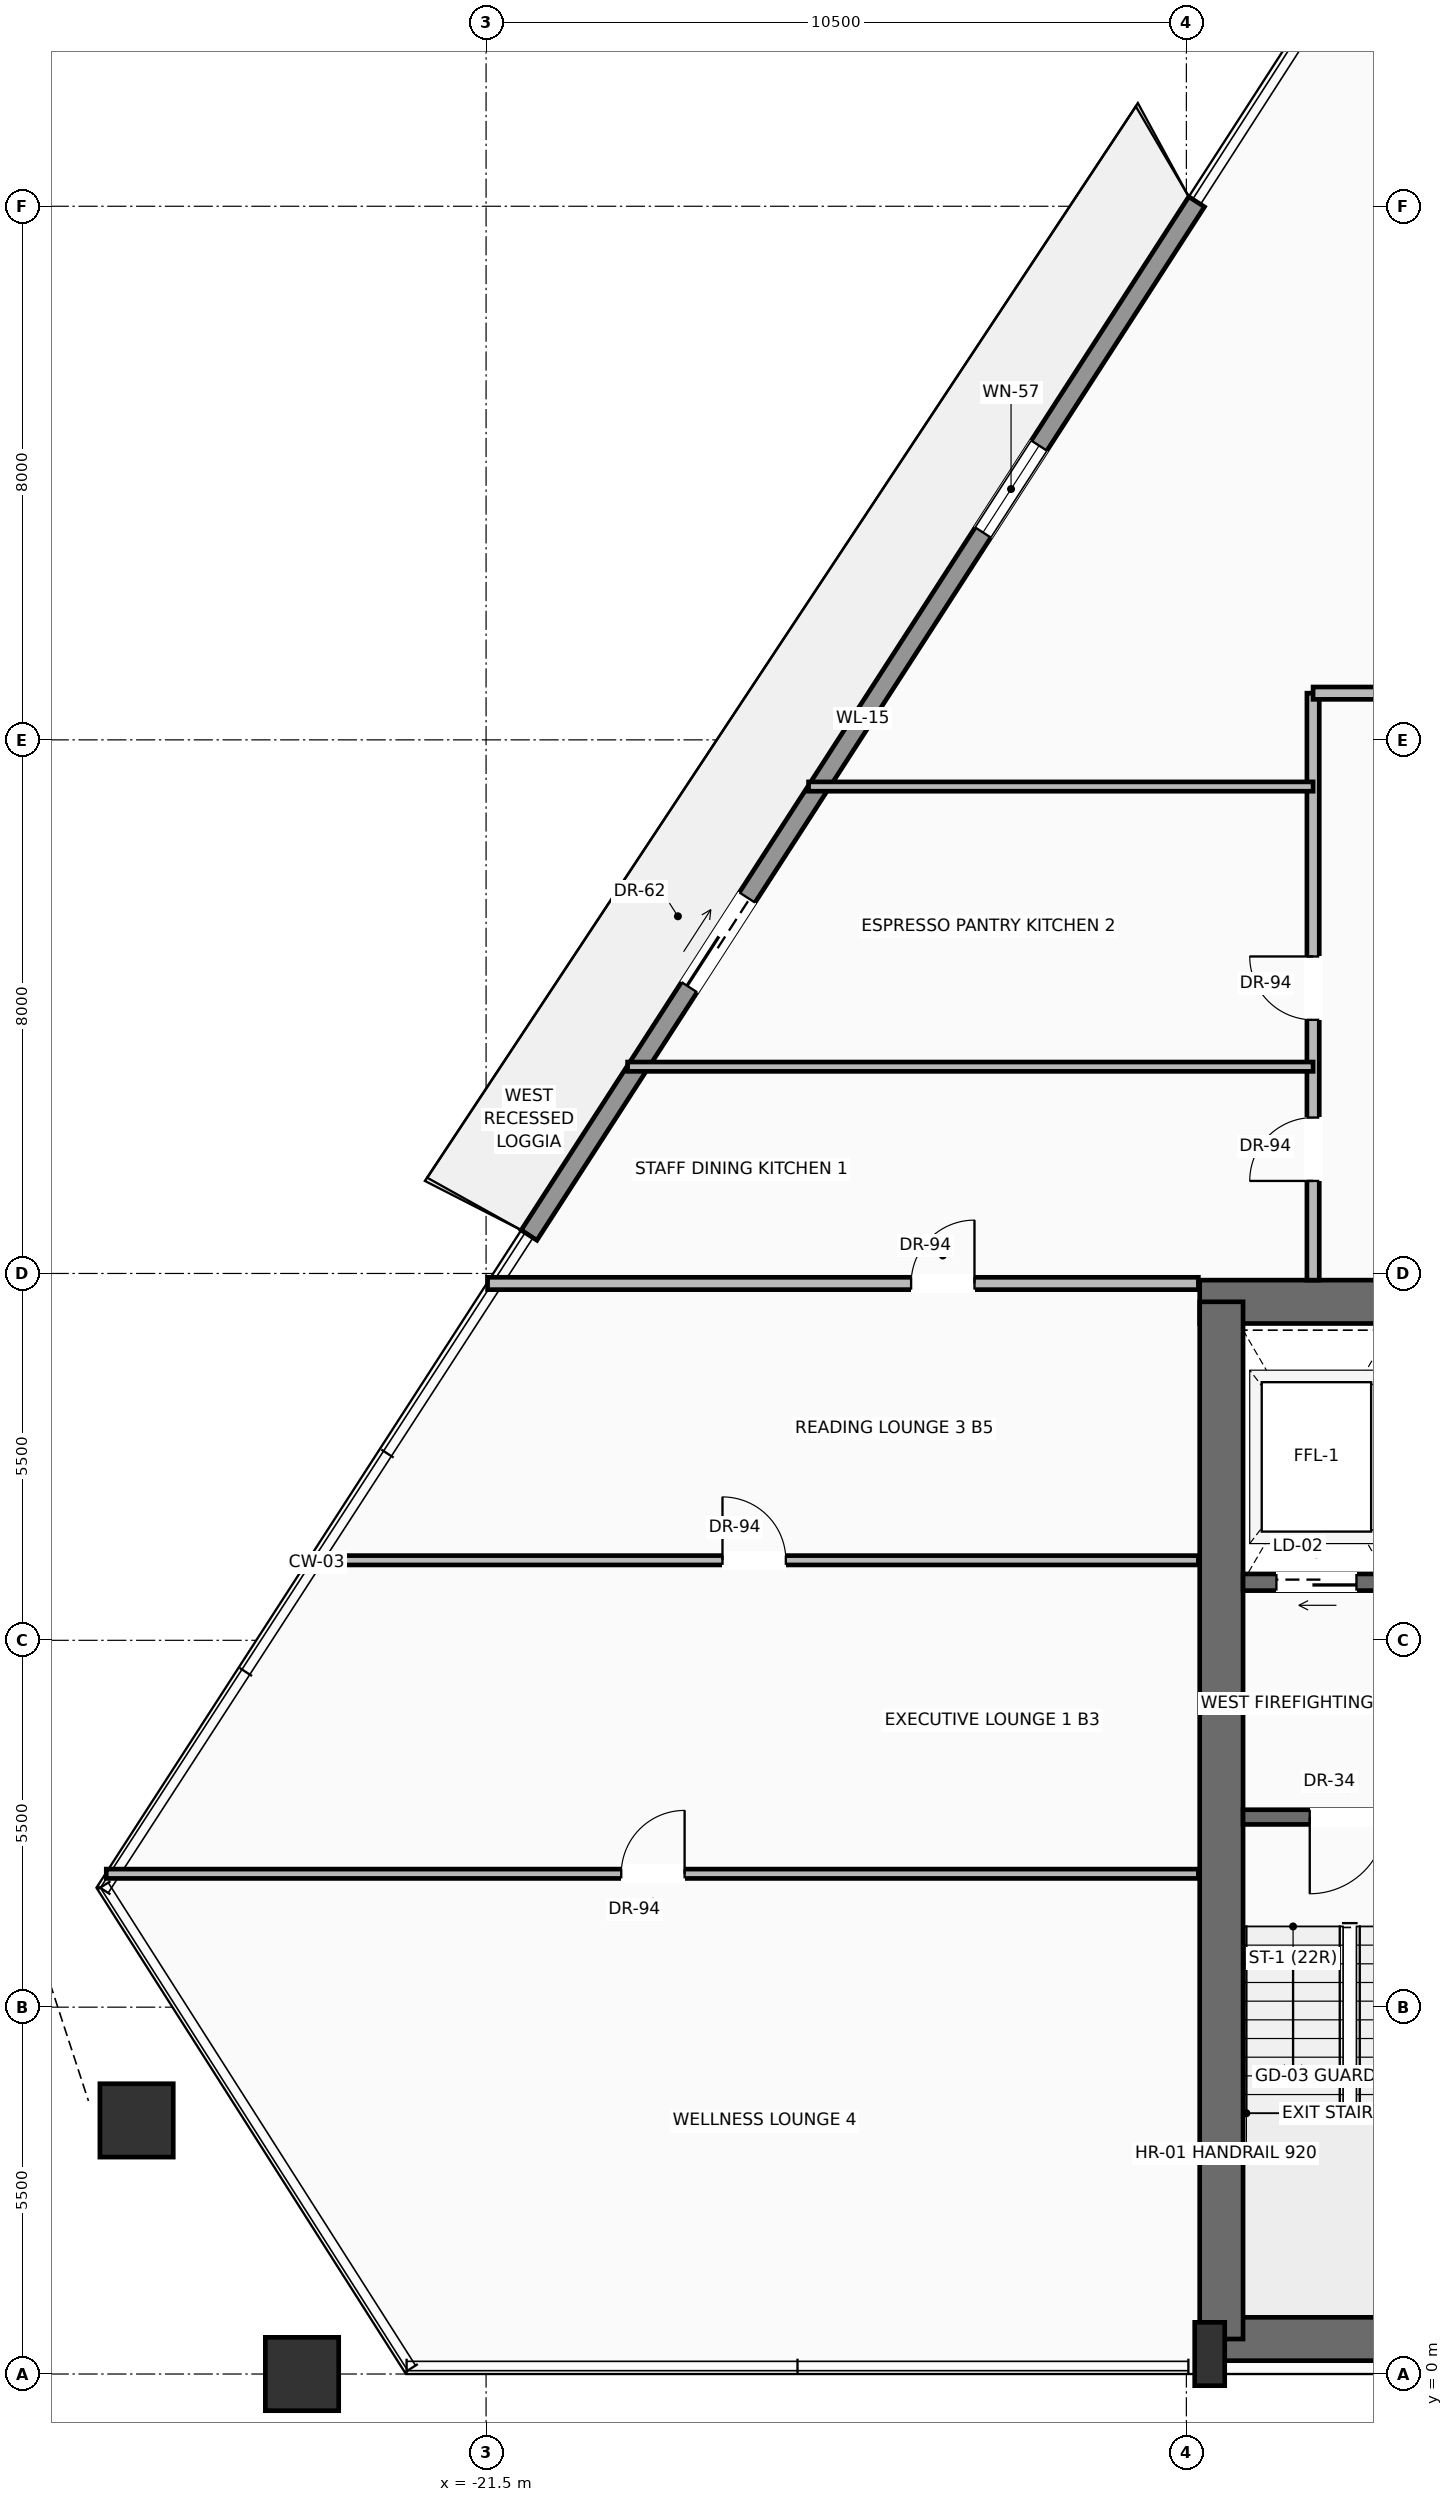
"""IFC4 building model, lengths in metres.
Left out: names, types, materials, properties, quantities, classifications, styles, units other than length and angle.
Written with IfcOpenShell. Run it as: python <this file> out.ifc"""

import sys

from ifc_helpers import new_model, si_unit, direction, frame, frame_2d, origin, origin_2d, place, context, subcontext, project, spatial, rectangle, hollow_rectangle, extrude, source, transform, mapped, element, fill, save


model = new_model("IFC4")
c1 = context("Model", 3, precision=1e-05, world=origin(), true_north=direction((0.0, 1.0)))
c2 = subcontext(c1, "Body", "Model", "MODEL_VIEW")
j1 = project(units=[si_unit("LENGTHUNIT", "METRE"), si_unit("PLANEANGLEUNIT", "RADIAN")], contexts=[c1])
p1 = place(None, origin())
s1 = spatial("IfcSite", under=j1, at=p1, CompositionType="ELEMENT")
p2 = place(p1, origin())
s2 = spatial("IfcBuilding", under=s1, at=p2, CompositionType="ELEMENT")
p3 = place(p2, frame((0.0, 0.0, 147.8)))
s3 = spatial("IfcBuildingStorey", under=s2, at=p3, CompositionType="ELEMENT", Elevation=147.8)
p4 = place(p3, frame((-10.65, 0.525, 0.0), z_axis=(0.0, 0.0, 1.0), x_axis=(1.0, 0.0, 0.0)))
e1 = element("IfcWall", 1, at=p4, inside=s3, PredefinedType="SHEAR", context=c2, shape_type="SweptSolid", body=[
    extrude(rectangle(XDim=21.3, YDim=0.65, at=frame_2d((10.65, 0.0))), origin(), (0.0, 0.0, 1.0), 3.47),
])
p5 = place(p3, frame((-10.8, 16.075, 0.0), z_axis=(0.0, 0.0, 1.0), x_axis=(1.0, 0.0, 0.0)))
e2 = element("IfcWall", 2, at=p5, inside=s3, PredefinedType="SHEAR", context=c2, shape_type="SweptSolid", body=[
    extrude(rectangle(XDim=21.6, YDim=0.65, at=frame_2d((10.8, 0.0))), origin(), (0.0, 0.0, 1.0), 3.47),
])
p6 = place(p5, frame((3.37, 0.0, 0.0)))
e3 = element("IfcOpeningElement", 3, at=p6, cuts=e2, PredefinedType="OPENING", context=c2, shape_type="SweptSolid", body=[
    extrude(rectangle(XDim=1.3, YDim=2.3, at=frame_2d((0.65, 1.15))), frame((0.0, 0.335, 0.0), z_axis=(0.0, -1.0, 0.0), x_axis=(1.0, 0.0, 0.0)), (0.0, 0.0, 1.0), 0.67),
])
p7 = place(p5, frame((9.8, 0.0, 0.0)))
e4 = element("IfcOpeningElement", 4, at=p7, cuts=e2, PredefinedType="OPENING", context=c2, shape_type="SweptSolid", body=[
    extrude(rectangle(XDim=2.0, YDim=2.4, at=frame_2d((1.0, 1.2))), frame((0.0, 0.335, 0.0), z_axis=(0.0, -1.0, 0.0), x_axis=(1.0, 0.0, 0.0)), (0.0, 0.0, 1.0), 0.67),
])
p8 = place(p3, frame((-10.475, 0.525, 0.0), z_axis=(0.0, 0.0, 1.0), x_axis=(0.0, 1.0, 0.0)))
e5 = element("IfcWall", 5, at=p8, inside=s3, PredefinedType="SHEAR", context=c2, shape_type="SweptSolid", body=[
    extrude(rectangle(XDim=15.55, YDim=0.65, at=frame_2d((7.775, 0.0))), origin(), (0.0, 0.0, 1.0), 3.47),
])
m1 = source(origin(), c2, "Body", "SweptSolid", [
    extrude(rectangle(XDim=0.45, YDim=0.95, at=origin_2d()), origin(), (0.0, 0.0, 1.0), 3.7),
])
p9 = place(p3, frame((-10.65, 0.3, 0.0), z_axis=(0.0, 0.0, 1.0), x_axis=(1.0, 0.0, 0.0)))
e6 = element("IfcColumn", 6, at=p9, inside=s3, PredefinedType="PILASTER", context=c2, shape_type="MappedRepresentation", body=[
    mapped(m1, transform((0.0, 0.0, 0.0), scale=1.0)),
])
m2 = source(origin(), c2, "Body", "SweptSolid", [
    extrude(hollow_rectangle(XDim=1.1, YDim=1.1, WallThickness=0.055, at=origin_2d()), origin(), (0.0, 0.0, 1.0), 3.691),
])
p10 = place(p3, frame((-24.26, 0.0, 0.004), z_axis=(-0.010185330494, 0.0, 0.999948128176), x_axis=(0.0, -1.0, 0.0)))
e7 = element("IfcColumn", 7, at=p10, inside=s3, PredefinedType="COLUMN", context=c2, shape_type="MappedRepresentation", body=[
    mapped(m2, transform((0.0, 0.0, 0.0), scale=1.0)),
])
m3 = source(origin(), c2, "Body", "SweptSolid", [
    extrude(hollow_rectangle(XDim=1.1, YDim=1.1, WallThickness=0.055, at=origin_2d()), origin(), (0.0, 0.0, 1.0), 3.692),
])
p11 = place(p3, frame((-26.74, 3.802, 0.004), z_axis=(0.000462934236, -0.016004297866, 0.999871815855), x_axis=(0.999581916595, 0.028913526513, 0.0)))
e8 = element("IfcColumn", 8, at=p11, inside=s3, PredefinedType="COLUMN", context=c2, shape_type="MappedRepresentation", body=[
    mapped(m3, transform((0.0, 0.0, 0.0), scale=1.0)),
])
p12 = place(p3, frame((-20.855, 17.074, 0.0), z_axis=(0.0, 0.0, 1.0), x_axis=(0.542622723872, 0.839976535112, 0.0)))
e9 = element("IfcWall", 9, at=p12, inside=s3, PredefinedType="SOLIDWALL", context=c2, shape_type="SweptSolid", body=[
    extrude(rectangle(XDim=18.445, YDim=0.28, at=frame_2d((9.222, 0.0))), origin(), (0.0, 0.0, 1.0), 3.05),
])
p13 = place(p12, frame((4.427, 0.0, 0.0)))
e10 = element("IfcOpeningElement", 10, at=p13, cuts=e9, PredefinedType="OPENING", context=c2, shape_type="SweptSolid", body=[
    extrude(rectangle(XDim=1.6, YDim=2.35, at=frame_2d((0.8, 1.175))), frame((0.0, 0.15, 0.0), z_axis=(0.0, -1.0, 0.0), x_axis=(1.0, 0.0, 0.0)), (0.0, 0.0, 1.0), 0.3),
])
p14 = place(p12, frame((12.542, 0.0, 0.9)))
e11 = element("IfcOpeningElement", 11, at=p14, cuts=e9, PredefinedType="OPENING", context=c2, shape_type="SweptSolid", body=[
    extrude(rectangle(XDim=1.55, YDim=1.85, at=frame_2d((0.775, 0.925))), frame((0.0, 0.15, 0.0), z_axis=(0.0, -1.0, 0.0), x_axis=(1.0, 0.0, 0.0)), (0.0, 0.0, 1.0), 0.3),
])
p15 = place(p3, frame((-5.5, 8.35, 0.0), z_axis=(0.0, 0.0, 1.0), x_axis=(-1.0, 0.0, 0.0)))
e12 = element("IfcWall", 12, at=p15, inside=s3, PredefinedType="SOLIDWALL", context=c2, shape_type="SweptSolid", body=[
    extrude(rectangle(XDim=4.65, YDim=0.22, at=frame_2d((2.325, 0.0))), origin(), (0.0, 0.0, 1.0), 3.47),
])
p16 = place(p15, frame((2.5, 0.0, 0.0)))
e13 = element("IfcOpeningElement", 13, at=p16, cuts=e12, PredefinedType="OPENING", context=c2, shape_type="SweptSolid", body=[
    extrude(rectangle(XDim=1.15, YDim=2.2, at=frame_2d((0.575, 1.1))), frame((0.0, 0.12, 0.0), z_axis=(0.0, -1.0, 0.0), x_axis=(1.0, 0.0, 0.0)), (0.0, 0.0, 1.0), 0.24),
])
p17 = place(p3, frame((-5.5, 11.87, 0.0), z_axis=(0.0, 0.0, 1.0), x_axis=(-1.0, 0.0, 0.0)))
e14 = element("IfcWall", 14, at=p17, inside=s3, PredefinedType="SOLIDWALL", context=c2, shape_type="SweptSolid", body=[
    extrude(rectangle(XDim=4.65, YDim=0.25, at=frame_2d((2.325, 0.0))), origin(), (0.0, 0.0, 1.0), 3.47),
])
p18 = place(p17, frame((2.95, 0.0, 0.0)))
e15 = element("IfcOpeningElement", 15, at=p18, cuts=e14, PredefinedType="OPENING", context=c2, shape_type="SweptSolid", body=[
    extrude(rectangle(XDim=1.2, YDim=2.25, at=frame_2d((0.6, 1.125))), frame((0.0, 0.135, 0.0), z_axis=(0.0, -1.0, 0.0), x_axis=(1.0, 0.0, 0.0)), (0.0, 0.0, 1.0), 0.27),
])
p19 = place(p3, frame((-9.1, 16.4, 0.0), z_axis=(0.0, 0.0, 1.0), x_axis=(0.0, 1.0, 0.0)))
e16 = element("IfcWall", 16, at=p19, inside=s3, PredefinedType="PARTITIONING", context=c2, shape_type="SweptSolid", body=[
    extrude(rectangle(XDim=8.8, YDim=0.185, at=frame_2d((4.4, 0.0))), origin(), (0.0, 0.0, 1.0), 2.846),
])
p20 = place(p19, frame((3.903, 0.0, 0.0)))
e17 = element("IfcOpeningElement", 17, at=p20, cuts=e16, PredefinedType="OPENING", context=c2, shape_type="SweptSolid", body=[
    extrude(rectangle(XDim=0.95, YDim=2.2, at=frame_2d((0.475, 1.1))), frame((0.0, 0.103, 0.0), z_axis=(0.0, -1.0, 0.0), x_axis=(1.0, 0.0, 0.0)), (0.0, 0.0, 1.0), 0.205),
])
p21 = place(p19, frame((1.487, 0.0, 0.0)))
e18 = element("IfcOpeningElement", 18, at=p21, cuts=e16, PredefinedType="OPENING", context=c2, shape_type="SweptSolid", body=[
    extrude(rectangle(XDim=0.95, YDim=2.2, at=frame_2d((0.475, 1.1))), frame((0.0, 0.103, 0.0), z_axis=(0.0, -1.0, 0.0), x_axis=(1.0, 0.0, 0.0)), (0.0, 0.0, 1.0), 0.205),
])
p22 = place(p3, frame((-9.1, 25.2, 0.0), z_axis=(0.0, 0.0, 1.0), x_axis=(1.0, 0.0, 0.0)))
e19 = element("IfcWall", 19, at=p22, inside=s3, PredefinedType="PARTITIONING", context=c2, shape_type="SweptSolid", body=[
    extrude(rectangle(XDim=2.2, YDim=0.185, at=frame_2d((1.1, 0.0))), origin(), (0.0, 0.0, 1.0), 3.462),
])
p23 = place(p3, frame((-21.478, 16.35, 0.0), z_axis=(0.0, 0.0, 1.0), x_axis=(1.0, 0.0, 0.0)))
e20 = element("IfcWall", 20, at=p23, inside=s3, PredefinedType="PARTITIONING", context=c2, shape_type="SweptSolid", body=[
    extrude(rectangle(XDim=10.657, YDim=0.185, at=frame_2d((5.329, 0.0))), origin(), (0.0, 0.0, 1.0), 3.462),
])
p24 = place(p23, frame((6.35, 0.0, 0.0)))
e21 = element("IfcOpeningElement", 21, at=p24, cuts=e20, PredefinedType="OPENING", context=c2, shape_type="SweptSolid", body=[
    extrude(rectangle(XDim=0.95, YDim=2.2, at=frame_2d((0.475, 1.1))), frame((0.0, 0.103, 0.0), z_axis=(0.0, -1.0, 0.0), x_axis=(1.0, 0.0, 0.0)), (0.0, 0.0, 1.0), 0.205),
])
p25 = place(p3, frame((-27.195, 7.5, 0.0), z_axis=(0.0, 0.0, 1.0), x_axis=(1.0, 0.0, 0.0)))
e22 = element("IfcWall", 22, at=p25, inside=s3, PredefinedType="PARTITIONING", context=c2, shape_type="SweptSolid", body=[
    extrude(rectangle(XDim=16.375, YDim=0.14, at=frame_2d((8.187, 0.0))), origin(), (0.0, 0.0, 1.0), 3.462),
])
p26 = place(p25, frame((7.721, 0.0, 0.0)))
e23 = element("IfcOpeningElement", 23, at=p26, cuts=e22, PredefinedType="OPENING", context=c2, shape_type="SweptSolid", body=[
    extrude(rectangle(XDim=0.95, YDim=2.2, at=frame_2d((0.475, 1.1))), frame((0.0, 0.08, 0.0), z_axis=(0.0, -1.0, 0.0), x_axis=(1.0, 0.0, 0.0)), (0.0, 0.0, 1.0), 0.16),
])
p27 = place(p3, frame((-24.158, 12.2, 0.0), z_axis=(0.0, 0.0, 1.0), x_axis=(1.0, 0.0, 0.0)))
e24 = element("IfcWall", 24, at=p27, inside=s3, PredefinedType="PARTITIONING", context=c2, shape_type="SweptSolid", body=[
    extrude(rectangle(XDim=13.338, YDim=0.14, at=frame_2d((6.669, 0.0))), origin(), (0.0, 0.0, 1.0), 3.462),
])
p28 = place(p27, frame((6.203, 0.0, 0.0)))
e25 = element("IfcOpeningElement", 25, at=p28, cuts=e24, PredefinedType="OPENING", context=c2, shape_type="SweptSolid", body=[
    extrude(rectangle(XDim=0.95, YDim=2.2, at=frame_2d((0.475, 1.1))), frame((0.0, 0.08, 0.0), z_axis=(0.0, -1.0, 0.0), x_axis=(1.0, 0.0, 0.0)), (0.0, 0.0, 1.0), 0.16),
])
p29 = place(p3, frame((-19.378, 19.6, 0.0), z_axis=(0.0, 0.0, 1.0), x_axis=(1.0, 0.0, 0.0)))
e26 = element("IfcWall", 26, at=p29, inside=s3, PredefinedType="PARTITIONING", context=c2, shape_type="SweptSolid", body=[
    extrude(rectangle(XDim=10.278, YDim=0.14, at=frame_2d((5.139, 0.0))), origin(), (0.0, 0.0, 1.0), 3.049),
])
p30 = place(p3, frame((-16.665, 23.8, 0.0), z_axis=(0.0, 0.0, 1.0), x_axis=(1.0, 0.0, 0.0)))
e27 = element("IfcWall", 27, at=p30, inside=s3, PredefinedType="PARTITIONING", context=c2, shape_type="SweptSolid", body=[
    extrude(rectangle(XDim=7.565, YDim=0.14, at=frame_2d((3.782, 0.0))), origin(), (0.0, 0.0, 1.0), 3.462),
])
m4 = source(origin(), c2, "Body", "SweptSolid", [
    extrude(rectangle(XDim=1.6, YDim=2.35, at=frame_2d((0.8, 1.175))), frame((0.0, 0.025, 0.0), z_axis=(0.0, -1.0, 0.0), x_axis=(1.0, 0.0, 0.0)), (0.0, 0.0, 1.0), 0.05),
])
p31 = place(p13, origin())
e28 = element("IfcDoor", 28, at=p31, inside=s3, OperationType="SLIDING_TO_LEFT", PredefinedType="DOOR", context=c2, shape_type="MappedRepresentation", body=[
    mapped(m4, transform((0.0, 0.0, 0.0), scale=1.0)),
])
fill(e10, e28)
m5 = source(origin(), c2, "Body", "SweptSolid", [
    extrude(rectangle(XDim=1.55, YDim=1.85, at=frame_2d((0.775, 0.925))), frame((0.0, 0.03, 0.0), z_axis=(0.0, -1.0, 0.0), x_axis=(1.0, 0.0, 0.0)), (0.0, 0.0, 1.0), 0.06),
])
p32 = place(p14, origin())
e29 = element("IfcWindow", 29, at=p32, inside=s3, PartitioningType="SINGLE_PANEL", PredefinedType="WINDOW", context=c2, shape_type="MappedRepresentation", body=[
    mapped(m5, transform((0.0, 0.0, 0.0), scale=1.0)),
])
fill(e11, e29)
m6 = source(origin(), c2, "Body", "SweptSolid", [
    extrude(rectangle(XDim=1.15, YDim=2.2, at=frame_2d((0.575, 1.1))), frame((0.0, 0.025, 0.0), z_axis=(0.0, -1.0, 0.0), x_axis=(1.0, 0.0, 0.0)), (0.0, 0.0, 1.0), 0.05),
])
p33 = place(p16, origin())
e30 = element("IfcDoor", 30, at=p33, inside=s3, OperationType="SINGLE_SWING_RIGHT", PredefinedType="DOOR", context=c2, shape_type="MappedRepresentation", body=[
    mapped(m6, transform((0.0, 0.0, 0.0), scale=1.0)),
])
fill(e13, e30)
m7 = source(origin(), c2, "Body", "SweptSolid", [
    extrude(rectangle(XDim=1.2, YDim=2.25, at=frame_2d((0.6, 1.125))), frame((0.0, 0.025, 0.0), z_axis=(0.0, -1.0, 0.0), x_axis=(1.0, 0.0, 0.0)), (0.0, 0.0, 1.0), 0.05),
])
p34 = place(p18, origin())
e31 = element("IfcDoor", 31, at=p34, inside=s3, OperationType="SLIDING_TO_LEFT", PredefinedType="DOOR", context=c2, shape_type="MappedRepresentation", body=[
    mapped(m7, transform((0.0, 0.0, 0.0), scale=1.0)),
])
fill(e15, e31)
m8 = source(origin(), c2, "Body", "SweptSolid", [
    extrude(rectangle(XDim=0.95, YDim=2.2, at=frame_2d((0.475, 1.1))), frame((0.0, 0.025, 0.0), z_axis=(0.0, -1.0, 0.0), x_axis=(1.0, 0.0, 0.0)), (0.0, 0.0, 1.0), 0.05),
])
p35 = place(p20, origin())
e32 = element("IfcDoor", 32, at=p35, inside=s3, OperationType="SINGLE_SWING_RIGHT", PredefinedType="DOOR", context=c2, shape_type="MappedRepresentation", body=[
    mapped(m8, transform((0.0, 0.0, 0.0), scale=1.0)),
])
fill(e17, e32)
p36 = place(p24, origin())
e33 = element("IfcDoor", 33, at=p36, inside=s3, OperationType="SINGLE_SWING_RIGHT", PredefinedType="DOOR", context=c2, shape_type="MappedRepresentation", body=[
    mapped(m8, transform((0.0, 0.0, 0.0), scale=1.0)),
])
fill(e21, e33)
p37 = place(p21, origin())
e34 = element("IfcDoor", 34, at=p37, inside=s3, OperationType="SINGLE_SWING_LEFT", PredefinedType="DOOR", context=c2, shape_type="MappedRepresentation", body=[
    mapped(m8, transform((0.0, 0.0, 0.0), scale=1.0)),
])
fill(e18, e34)
p38 = place(p28, origin())
e35 = element("IfcDoor", 35, at=p38, inside=s3, OperationType="SINGLE_SWING_LEFT", PredefinedType="DOOR", context=c2, shape_type="MappedRepresentation", body=[
    mapped(m8, transform((0.0, 0.0, 0.0), scale=1.0)),
])
fill(e25, e35)
p39 = place(p26, origin())
e36 = element("IfcDoor", 36, at=p39, inside=s3, OperationType="SINGLE_SWING_RIGHT", PredefinedType="DOOR", context=c2, shape_type="MappedRepresentation", body=[
    mapped(m8, transform((0.0, 0.0, 0.0), scale=1.0)),
])
fill(e23, e36)
save(model, sys.argv[1])
